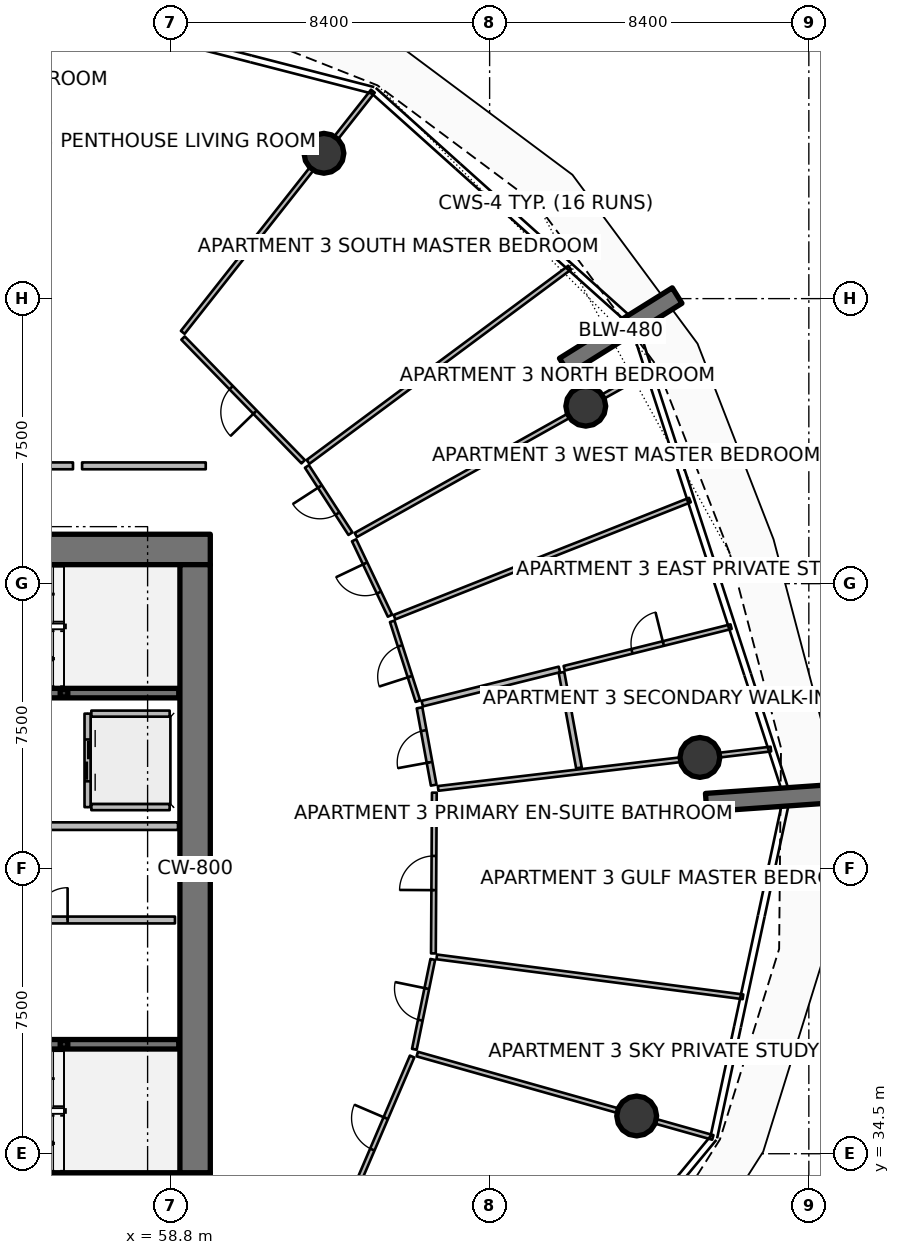
"""IFC4 building model, lengths in metres.
Left out: names, types, materials, properties, quantities, classifications, styles, units other than length and angle.
Written with IfcOpenShell. Run it as: python <this file> out.ifc"""

import sys

from ifc_helpers import new_model, si_unit, direction, frame, frame_2d, origin, origin_2d, place, context, subcontext, project, spatial, rectangle, hollow_rectangle, circle, extrude, element, fill, save


model = new_model("IFC4")
c1 = context("Model", 3, precision=1e-05, world=origin(), true_north=direction((0.0, 1.0)))
c2 = subcontext(c1, "Body", "Model", "MODEL_VIEW")
j1 = project(units=[si_unit("LENGTHUNIT", "METRE"), si_unit("PLANEANGLEUNIT", "RADIAN")], contexts=[c1])
p1 = place(None, origin())
s1 = spatial("IfcSite", under=j1, at=p1, CompositionType="ELEMENT")
p2 = place(p1, origin())
s2 = spatial("IfcBuilding", under=s1, at=p2, CompositionType="ELEMENT")
p3 = place(p2, frame((0.0, 0.0, 127.8)))
s3 = spatial("IfcBuildingStorey", under=s2, at=p3, CompositionType="ELEMENT", Elevation=127.8)
for number, where, z_axis, x_axis in (
    (1, (49.95, 33.6, 0.0), (0.0, 0.0, 1.0), (1.0, 0.0, 0.0)),
    (2, (49.95, 50.4, 0.0), (0.0, 0.0, 1.0), (1.0, 0.0, 0.0)),
):
    element("IfcWall", number, at=place(p3, frame(where, z_axis=z_axis, x_axis=x_axis)), inside=s3, PredefinedType="SHEAR", context=c2, shape_type="SweptSolid", body=[
        extrude(rectangle(XDim=9.9, YDim=0.8, at=frame_2d((4.95, 0.0))), origin(), (0.0, 0.0, 1.0), 3.75),
    ])
p4 = place(p3, frame((59.45, 34.0, 0.0), z_axis=(0.0, 0.0, 1.0), x_axis=(0.0, 1.0, 0.0)))
e3 = element("IfcWall", 3, at=p4, inside=s3, PredefinedType="SHEAR", context=c2, shape_type="SweptSolid", body=[
    extrude(rectangle(XDim=16.0, YDim=0.8, at=frame_2d((8.0, 0.0))), origin(), (0.0, 0.0, 1.0), 3.75),
])
for number, where, z_axis, x_axis in (
    (4, (56.0, 46.62, 0.0), (0.0, 0.0, 1.0), (1.0, 0.0, 0.0)),
    (5, (56.0, 37.38, 0.0), (0.0, 0.0, 1.0), (1.0, 0.0, 0.0)),
):
    element("IfcColumn", number, at=place(p3, frame(where, z_axis=z_axis, x_axis=x_axis)), inside=s3, PredefinedType="COLUMN", context=c2, shape_type="SweptSolid", body=[
        extrude(hollow_rectangle(XDim=0.2, YDim=0.2, WallThickness=0.01, InnerFilletRadius=0.01, OuterFilletRadius=0.02, at=origin_2d()), origin(), (0.0, 0.0, 1.0), 1.67),
    ])
for number, where, z_axis, x_axis in (
    (6, (69.165, 55.226, 0.0), (0.0, 0.0, 1.0), (0.848, 0.53, 0.0)),
    (7, (72.897, 43.741, 0.0), (0.0, 0.0, 1.0), (0.998, 0.07, 0.0)),
):
    element("IfcWall", number, at=place(p3, frame(where, z_axis=z_axis, x_axis=x_axis)), inside=s3, PredefinedType="SOLIDWALL", context=c2, shape_type="SweptSolid", body=[
        extrude(rectangle(XDim=3.5, YDim=0.48, at=frame_2d((1.75, 0.0))), origin(), (0.0, 0.0, 1.0), 3.75),
    ])
for number, where, z_axis, x_axis in (
    (8, (69.73, 54.169, 0.0), (0.0, 0.0, 1.0), (1.0, 0.0, 0.0)),
    (9, (62.84, 60.824, 0.0), (0.0, 0.0, 1.0), (1.0, 0.0, 0.0)),
    (10, (71.07, 35.494, 0.0), (0.0, 0.0, 1.0), (1.0, 0.0, 0.0)),
    (11, (72.733, 44.927, 0.0), (0.0, 0.0, 1.0), (1.0, 0.0, 0.0)),
):
    element("IfcColumn", number, at=place(p3, frame(where, z_axis=z_axis, x_axis=x_axis)), inside=s3, PredefinedType="COLUMN", context=c2, shape_type="SweptSolid", body=[
        extrude(circle(Radius=0.525, at=origin_2d()), origin(), (0.0, 0.0, 1.0), 3.5),
    ])
p5 = place(p3, frame((51.48, 46.62, 0.0), z_axis=(0.0, 0.0, 1.0), x_axis=(1.0, 0.0, 0.0)))
e12 = element("IfcWall", 12, at=p5, inside=s3, PredefinedType="SOLIDWALL", context=c2, shape_type="SweptSolid", body=[
    extrude(rectangle(XDim=7.54, YDim=0.25, at=frame_2d((3.77, 0.0))), origin(), (0.0, 0.0, 1.0), 3.5),
])
p6 = place(p5, frame((0.3, 0.0, 0.0)))
e13 = element("IfcOpeningElement", 13, at=p6, cuts=e12, PredefinedType="OPENING", context=c2, shape_type="SweptSolid", body=[
    extrude(rectangle(XDim=1.55, YDim=2.15, at=frame_2d((0.775, 1.075))), frame((0.0, 0.135, 0.0), z_axis=(0.0, -1.0, 0.0), x_axis=(1.0, 0.0, 0.0)), (0.0, 0.0, 1.0), 0.27),
])
p7 = place(p3, frame((51.48, 37.38, 0.0), z_axis=(0.0, 0.0, 1.0), x_axis=(1.0, 0.0, 0.0)))
e14 = element("IfcWall", 14, at=p7, inside=s3, PredefinedType="SOLIDWALL", context=c2, shape_type="SweptSolid", body=[
    extrude(rectangle(XDim=7.54, YDim=0.25, at=frame_2d((3.77, 0.0))), origin(), (0.0, 0.0, 1.0), 3.5),
])
p8 = place(p7, frame((0.3, 0.0, 0.0)))
e15 = element("IfcOpeningElement", 15, at=p8, cuts=e14, PredefinedType="OPENING", context=c2, shape_type="SweptSolid", body=[
    extrude(rectangle(XDim=1.55, YDim=2.15, at=frame_2d((0.775, 1.075))), frame((0.0, 0.135, 0.0), z_axis=(0.0, -1.0, 0.0), x_axis=(1.0, 0.0, 0.0)), (0.0, 0.0, 1.0), 0.27),
])
p9 = place(p3, frame((56.62, 46.08, 0.0), z_axis=(0.0, 0.0, 1.0), x_axis=(0.0, -1.0, 0.0)))
e16 = element("IfcWall", 16, at=p9, inside=s3, PredefinedType="PARTITIONING", context=c2, shape_type="SweptSolid", body=[
    extrude(rectangle(XDim=2.46, YDim=0.16, at=frame_2d((1.23, 0.0))), origin(), (0.0, 0.0, 1.0), 3.5),
])
p10 = place(p9, frame((0.68, 0.0, 0.0)))
e17 = element("IfcOpeningElement", 17, at=p10, cuts=e16, PredefinedType="OPENING", context=c2, shape_type="SweptSolid", body=[
    extrude(rectangle(XDim=1.1, YDim=2.1, at=frame_2d((0.55, 1.05))), frame((0.0, 0.09, 0.0), z_axis=(0.0, -1.0, 0.0), x_axis=(1.0, 0.0, 0.0)), (0.0, 0.0, 1.0), 0.18),
])
for number, where, z_axis, x_axis in (
    (18, (56.72, 46.08, 0.0), (0.0, 0.0, 1.0), (1.0, 0.0, 0.0)),
    (19, (56.72, 43.62, 0.0), (0.0, 0.0, 1.0), (1.0, 0.0, 0.0)),
):
    element("IfcWall", number, at=place(p3, frame(where, z_axis=z_axis, x_axis=x_axis)), inside=s3, PredefinedType="PARTITIONING", context=c2, shape_type="SweptSolid", body=[
        extrude(rectangle(XDim=2.06, YDim=0.16, at=frame_2d((1.03, 0.0))), origin(), (0.0, 0.0, 1.0), 3.5),
    ])
p11 = place(p3, frame((52.42, 40.65, 0.0), z_axis=(0.0, 0.0, 1.0), x_axis=(1.0, 0.0, 0.0)))
e20 = element("IfcWall", 20, at=p11, inside=s3, PredefinedType="PARTITIONING", context=c2, shape_type="SweptSolid", body=[
    extrude(rectangle(XDim=6.5, YDim=0.18, at=frame_2d((3.25, 0.0))), origin(), (0.0, 0.0, 1.0), 3.5),
])
p12 = place(p11, frame((2.825, 0.0, 0.0)))
e21 = element("IfcOpeningElement", 21, at=p12, cuts=e20, PredefinedType="OPENING", context=c2, shape_type="SweptSolid", body=[
    extrude(rectangle(XDim=0.85, YDim=2.06, at=frame_2d((0.425, 1.03))), frame((0.0, 0.1, 0.0), z_axis=(0.0, -1.0, 0.0), x_axis=(1.0, 0.0, 0.0)), (0.0, 0.0, 1.0), 0.2),
])
p13 = place(p3, frame((50.12, 43.12, 0.0), z_axis=(0.0, 0.0, 1.0), x_axis=(1.0, 0.0, 0.0)))
e22 = element("IfcWall", 22, at=p13, inside=s3, PredefinedType="PARTITIONING", context=c2, shape_type="SweptSolid", body=[
    extrude(rectangle(XDim=8.88, YDim=0.2, at=frame_2d((4.44, 0.0))), origin(), (0.0, 0.0, 1.0), 3.5),
])
p14 = place(p3, frame((56.236, 52.6, 0.0), z_axis=(0.0, 0.0, 1.0), x_axis=(-1.0, 0.0, 0.0)))
e23 = element("IfcWall", 23, at=p14, inside=s3, PredefinedType="PARTITIONING", context=c2, shape_type="SweptSolid", body=[
    extrude(rectangle(XDim=5.127, YDim=0.18, at=frame_2d((2.563, 0.0))), origin(), (0.0, 0.0, 1.0), 2.94),
])
p15 = place(p14, frame((2.013, 0.0, 0.0)))
e24 = element("IfcOpeningElement", 24, at=p15, cuts=e23, PredefinedType="OPENING", context=c2, shape_type="SweptSolid", body=[
    extrude(rectangle(XDim=1.1, YDim=2.1, at=frame_2d((0.55, 1.05))), frame((0.0, 0.1, 0.0), z_axis=(0.0, -1.0, 0.0), x_axis=(1.0, 0.0, 0.0)), (0.0, 0.0, 1.0), 0.2),
])
p16 = place(p3, frame((63.42, 32.989, 0.0), z_axis=(0.0, 0.0, 1.0), x_axis=(0.393166713518, 0.919467201906, 0.0)))
e25 = element("IfcWall", 25, at=p16, inside=s3, PredefinedType="PARTITIONING", context=c2, shape_type="SweptSolid", body=[
    extrude(rectangle(XDim=4.425, YDim=0.125, at=frame_2d((2.212, 0.0))), origin(), (0.0, 0.0, 1.0), 2.94),
])
p17 = place(p16, frame((1.762, 0.0, 0.0)))
e26 = element("IfcOpeningElement", 26, at=p17, cuts=e25, PredefinedType="OPENING", context=c2, shape_type="SweptSolid", body=[
    extrude(rectangle(XDim=0.9, YDim=2.08, at=frame_2d((0.45, 1.04))), frame((0.0, 0.073, 0.0), z_axis=(0.0, -1.0, 0.0), x_axis=(1.0, 0.0, 0.0)), (0.0, 0.0, 1.0), 0.145),
])
p18 = place(p3, frame((65.295, 37.122, 0.0), z_axis=(0.0, 0.0, 1.0), x_axis=(0.96245433073, -0.271443661297, 0.0)))
e27 = element("IfcWall", 27, at=p18, inside=s3, PredefinedType="PARTITIONING", context=c2, shape_type="SweptSolid", body=[
    extrude(rectangle(XDim=8.081, YDim=0.125, at=frame_2d((4.041, 0.0))), origin(), (0.0, 0.0, 1.0), 2.94),
])
p19 = place(p3, frame((65.809, 39.679, 0.0), z_axis=(0.0, 0.0, 1.0), x_axis=(0.991611465086, -0.129254409247, 0.0)))
e28 = element("IfcWall", 28, at=p19, inside=s3, PredefinedType="PARTITIONING", context=c2, shape_type="SweptSolid", body=[
    extrude(rectangle(XDim=8.126, YDim=0.125, at=frame_2d((4.063, 0.0))), origin(), (0.0, 0.0, 1.0), 2.94),
])
p20 = place(p3, frame((65.219, 37.247, 0.0), z_axis=(0.0, 0.0, 1.0), x_axis=(0.20083963331, 0.979624132865, 0.0)))
e29 = element("IfcWall", 29, at=p20, inside=s3, PredefinedType="PARTITIONING", context=c2, shape_type="SweptSolid", body=[
    extrude(rectangle(XDim=2.414, YDim=0.125, at=frame_2d((1.207, 0.0))), origin(), (0.0, 0.0, 1.0), 2.94),
])
p21 = place(p20, frame((0.782, 0.0, 0.0)))
e30 = element("IfcOpeningElement", 30, at=p21, cuts=e29, PredefinedType="OPENING", context=c2, shape_type="SweptSolid", body=[
    extrude(rectangle(XDim=0.85, YDim=2.06, at=frame_2d((0.425, 1.03))), frame((0.0, 0.073, 0.0), z_axis=(0.0, -1.0, 0.0), x_axis=(1.0, 0.0, 0.0)), (0.0, 0.0, 1.0), 0.145),
])
p22 = place(p3, frame((65.721, 39.771, 0.0), z_axis=(0.0, 0.0, 1.0), x_axis=(0.005887343855, 0.999982669441, 0.0)))
e31 = element("IfcWall", 31, at=p22, inside=s3, PredefinedType="PARTITIONING", context=c2, shape_type="SweptSolid", body=[
    extrude(rectangle(XDim=4.23, YDim=0.125, at=frame_2d((2.115, 0.0))), origin(), (0.0, 0.0, 1.0), 2.94),
])
p23 = place(p22, frame((1.665, 0.0, 0.0)))
e32 = element("IfcOpeningElement", 32, at=p23, cuts=e31, PredefinedType="OPENING", context=c2, shape_type="SweptSolid", body=[
    extrude(rectangle(XDim=0.9, YDim=2.08, at=frame_2d((0.45, 1.04))), frame((0.0, 0.073, 0.0), z_axis=(0.0, -1.0, 0.0), x_axis=(1.0, 0.0, 0.0)), (0.0, 0.0, 1.0), 0.145),
])
p24 = place(p3, frame((65.845, 44.112, 0.0), z_axis=(0.0, 0.0, 1.0), x_axis=(0.993069843717, 0.117525680174, 0.0)))
e33 = element("IfcWall", 33, at=p24, inside=s3, PredefinedType="PARTITIONING", context=c2, shape_type="SweptSolid", body=[
    extrude(rectangle(XDim=8.816, YDim=0.125, at=frame_2d((4.408, 0.0))), origin(), (0.0, 0.0, 1.0), 2.94),
])
p25 = place(p3, frame((65.728, 44.199, 0.0), z_axis=(0.0, 0.0, 1.0), x_axis=(-0.180017600937, 0.983663389251, 0.0)))
e34 = element("IfcWall", 34, at=p25, inside=s3, PredefinedType="PARTITIONING", context=c2, shape_type="SweptSolid", body=[
    extrude(rectangle(XDim=2.068, YDim=0.15, at=frame_2d((1.034, 0.0))), origin(), (0.0, 0.0, 1.0), 2.94),
])
p26 = place(p25, frame((0.609, 0.0, 0.0)))
e35 = element("IfcOpeningElement", 35, at=p26, cuts=e34, PredefinedType="OPENING", context=c2, shape_type="SweptSolid", body=[
    extrude(rectangle(XDim=0.85, YDim=2.06, at=frame_2d((0.425, 1.03))), frame((0.0, 0.085, 0.0), z_axis=(0.0, -1.0, 0.0), x_axis=(1.0, 0.0, 0.0)), (0.0, 0.0, 1.0), 0.17),
])
p27 = place(p3, frame((69.552, 44.651, 0.0), z_axis=(0.0, 0.0, 1.0), x_axis=(-0.18004586416, 0.983658216455, 0.0)))
e36 = element("IfcWall", 36, at=p27, inside=s3, PredefinedType="PARTITIONING", context=c2, shape_type="SweptSolid", body=[
    extrude(rectangle(XDim=2.555, YDim=0.15, at=frame_2d((1.277, 0.0))), origin(), (0.0, 0.0, 1.0), 2.94),
])
p28 = place(p3, frame((65.427, 46.344, 0.0), z_axis=(0.0, 0.0, 1.0), x_axis=(0.97033137229, 0.241778882348, 0.0)))
e37 = element("IfcWall", 37, at=p28, inside=s3, PredefinedType="PARTITIONING", context=c2, shape_type="SweptSolid", body=[
    extrude(rectangle(XDim=3.72, YDim=0.15, at=frame_2d((1.86, 0.0))), origin(), (0.0, 0.0, 1.0), 2.94),
])
p29 = place(p3, frame((69.163, 47.274, 0.0), z_axis=(0.0, 0.0, 1.0), x_axis=(0.970313623087, 0.241850104098, 0.0)))
e38 = element("IfcWall", 38, at=p29, inside=s3, PredefinedType="PARTITIONING", context=c2, shape_type="SweptSolid", body=[
    extrude(rectangle(XDim=4.525, YDim=0.125, at=frame_2d((2.263, 0.0))), origin(), (0.0, 0.0, 1.0), 2.94),
])
p30 = place(p29, frame((1.838, 0.0, 0.0)))
e39 = element("IfcOpeningElement", 39, at=p30, cuts=e38, PredefinedType="OPENING", context=c2, shape_type="SweptSolid", body=[
    extrude(rectangle(XDim=0.85, YDim=2.06, at=frame_2d((0.425, 1.03))), frame((0.0, 0.073, 0.0), z_axis=(0.0, -1.0, 0.0), x_axis=(1.0, 0.0, 0.0)), (0.0, 0.0, 1.0), 0.145),
])
p31 = place(p3, frame((64.696, 48.618, 0.0), z_axis=(0.0, 0.0, 1.0), x_axis=(0.92963773473, 0.368474805335, 0.0)))
e40 = element("IfcWall", 40, at=p31, inside=s3, PredefinedType="PARTITIONING", context=c2, shape_type="SweptSolid", body=[
    extrude(rectangle(XDim=8.364, YDim=0.125, at=frame_2d((4.182, 0.0))), origin(), (0.0, 0.0, 1.0), 2.94),
])
p32 = place(p3, frame((65.312, 46.407, 0.0), z_axis=(0.0, 0.0, 1.0), x_axis=(-0.305823000028, 0.952088384896, 0.0)))
e41 = element("IfcWall", 41, at=p32, inside=s3, PredefinedType="PARTITIONING", context=c2, shape_type="SweptSolid", body=[
    extrude(rectangle(XDim=2.207, YDim=0.125, at=frame_2d((1.104, 0.0))), origin(), (0.0, 0.0, 1.0), 2.94),
])
p33 = place(p32, frame((0.679, 0.0, 0.0)))
e42 = element("IfcOpeningElement", 42, at=p33, cuts=e41, PredefinedType="OPENING", context=c2, shape_type="SweptSolid", body=[
    extrude(rectangle(XDim=0.85, YDim=2.06, at=frame_2d((0.425, 1.03))), frame((0.0, 0.073, 0.0), z_axis=(0.0, -1.0, 0.0), x_axis=(1.0, 0.0, 0.0)), (0.0, 0.0, 1.0), 0.145),
])
p34 = place(p3, frame((64.578, 48.657, 0.0), z_axis=(0.0, 0.0, 1.0), x_axis=(-0.429437528435, 0.903096566914, 0.0)))
e43 = element("IfcWall", 43, at=p34, inside=s3, PredefinedType="PARTITIONING", context=c2, shape_type="SweptSolid", body=[
    extrude(rectangle(XDim=2.197, YDim=0.125, at=frame_2d((1.099, 0.0))), origin(), (0.0, 0.0, 1.0), 2.94),
])
p35 = place(p34, frame((0.674, 0.0, 0.0)))
e44 = element("IfcOpeningElement", 44, at=p35, cuts=e43, PredefinedType="OPENING", context=c2, shape_type="SweptSolid", body=[
    extrude(rectangle(XDim=0.85, YDim=2.06, at=frame_2d((0.425, 1.03))), frame((0.0, 0.073, 0.0), z_axis=(0.0, -1.0, 0.0), x_axis=(1.0, 0.0, 0.0)), (0.0, 0.0, 1.0), 0.145),
])
p36 = place(p3, frame((59.73, 52.6, 0.0), z_axis=(0.0, 0.0, 1.0), x_axis=(-1.0, 0.0, 0.0)))
e45 = element("IfcWall", 45, at=p36, inside=s3, PredefinedType="PARTITIONING", context=c2, shape_type="SweptSolid", body=[
    extrude(rectangle(XDim=3.254, YDim=0.18, at=frame_2d((1.627, 0.0))), origin(), (0.0, 0.0, 1.0), 2.94),
])
p37 = place(p3, frame((63.679, 50.781, 0.0), z_axis=(0.0, 0.0, 1.0), x_axis=(0.872493265844, 0.488626136281, 0.0)))
e46 = element("IfcWall", 46, at=p37, inside=s3, PredefinedType="PARTITIONING", context=c2, shape_type="SweptSolid", body=[
    extrude(rectangle(XDim=8.816, YDim=0.125, at=frame_2d((4.408, 0.0))), origin(), (0.0, 0.0, 1.0), 2.94),
])
p38 = place(p3, frame((59.125, 56.112, 0.0), z_axis=(0.0, 0.0, 1.0), x_axis=(0.61910151414, 0.78531096719, 0.0)))
e47 = element("IfcWall", 47, at=p38, inside=s3, PredefinedType="PARTITIONING", context=c2, shape_type="SweptSolid", body=[
    extrude(rectangle(XDim=8.082, YDim=0.125, at=frame_2d((4.041, 0.0))), origin(), (0.0, 0.0, 1.0), 2.94),
])
p39 = place(p3, frame((62.421, 52.704, 0.0), z_axis=(0.0, 0.0, 1.0), x_axis=(0.802973178232, 0.596015163431, 0.0)))
e48 = element("IfcWall", 48, at=p39, inside=s3, PredefinedType="PARTITIONING", context=c2, shape_type="SweptSolid", body=[
    extrude(rectangle(XDim=8.574, YDim=0.125, at=frame_2d((4.287, 0.0))), origin(), (0.0, 0.0, 1.0), 2.94),
])
p40 = place(p3, frame((63.537, 50.816, 0.0), z_axis=(0.0, 0.0, 1.0), x_axis=(-0.543467563656, 0.839430168182, 0.0)))
e49 = element("IfcWall", 49, at=p40, inside=s3, PredefinedType="PARTITIONING", context=c2, shape_type="SweptSolid", body=[
    extrude(rectangle(XDim=2.106, YDim=0.125, at=frame_2d((1.053, 0.0))), origin(), (0.0, 0.0, 1.0), 2.94),
])
p41 = place(p40, frame((0.628, 0.0, 0.0)))
e50 = element("IfcOpeningElement", 50, at=p41, cuts=e49, PredefinedType="OPENING", context=c2, shape_type="SweptSolid", body=[
    extrude(rectangle(XDim=0.85, YDim=2.06, at=frame_2d((0.425, 1.03))), frame((0.0, 0.073, 0.0), z_axis=(0.0, -1.0, 0.0), x_axis=(1.0, 0.0, 0.0)), (0.0, 0.0, 1.0), 0.145),
])
p42 = place(p3, frame((62.293, 52.708, 0.0), z_axis=(0.0, 0.0, 1.0), x_axis=(-0.696779354898, 0.717285529331, 0.0)))
e51 = element("IfcWall", 51, at=p42, inside=s3, PredefinedType="PARTITIONING", context=c2, shape_type="SweptSolid", body=[
    extrude(rectangle(XDim=4.536, YDim=0.125, at=frame_2d((2.268, 0.0))), origin(), (0.0, 0.0, 1.0), 2.94),
])
p43 = place(p42, frame((1.818, 0.0, 0.0)))
e52 = element("IfcOpeningElement", 52, at=p43, cuts=e51, PredefinedType="OPENING", context=c2, shape_type="SweptSolid", body=[
    extrude(rectangle(XDim=0.9, YDim=2.08, at=frame_2d((0.45, 1.04))), frame((0.0, 0.073, 0.0), z_axis=(0.0, -1.0, 0.0), x_axis=(1.0, 0.0, 0.0)), (0.0, 0.0, 1.0), 0.145),
])
p44 = place(p10, origin())
e53 = element("IfcDoor", 53, at=p44, inside=s3, OperationType="DOUBLE_DOOR_SLIDING", PredefinedType="DOOR", context=c2, shape_type="SweptSolid", body=[
    extrude(rectangle(XDim=1.1, YDim=2.1, at=frame_2d((0.55, 1.05))), frame((0.0, 0.025, 0.0), z_axis=(0.0, -1.0, 0.0), x_axis=(1.0, 0.0, 0.0)), (0.0, 0.0, 1.0), 0.05),
])
fill(e17, e53)
p45 = place(p12, origin())
e54 = element("IfcDoor", 54, at=p45, inside=s3, OperationType="SINGLE_SWING_RIGHT", PredefinedType="DOOR", context=c2, shape_type="SweptSolid", body=[
    extrude(rectangle(XDim=0.85, YDim=2.06, at=frame_2d((0.425, 1.03))), frame((0.0, 0.025, 0.0), z_axis=(0.0, -1.0, 0.0), x_axis=(1.0, 0.0, 0.0)), (0.0, 0.0, 1.0), 0.05),
])
fill(e21, e54)
p46 = place(p17, origin())
e55 = element("IfcDoor", 55, at=p46, inside=s3, OperationType="SINGLE_SWING_RIGHT", PredefinedType="DOOR", context=c2, shape_type="SweptSolid", body=[
    extrude(rectangle(XDim=0.9, YDim=2.08, at=frame_2d((0.45, 1.04))), frame((0.0, 0.025, 0.0), z_axis=(0.0, -1.0, 0.0), x_axis=(1.0, 0.0, 0.0)), (0.0, 0.0, 1.0), 0.05),
])
fill(e26, e55)
p47 = place(p21, origin())
e56 = element("IfcDoor", 56, at=p47, inside=s3, OperationType="SINGLE_SWING_RIGHT", PredefinedType="DOOR", context=c2, shape_type="SweptSolid", body=[
    extrude(rectangle(XDim=0.85, YDim=2.06, at=frame_2d((0.425, 1.03))), frame((0.0, 0.025, 0.0), z_axis=(0.0, -1.0, 0.0), x_axis=(1.0, 0.0, 0.0)), (0.0, 0.0, 1.0), 0.05),
])
fill(e30, e56)
p48 = place(p23, origin())
e57 = element("IfcDoor", 57, at=p48, inside=s3, OperationType="SINGLE_SWING_LEFT", PredefinedType="DOOR", context=c2, shape_type="SweptSolid", body=[
    extrude(rectangle(XDim=0.9, YDim=2.08, at=frame_2d((0.45, 1.04))), frame((0.0, 0.025, 0.0), z_axis=(0.0, -1.0, 0.0), x_axis=(1.0, 0.0, 0.0)), (0.0, 0.0, 1.0), 0.05),
])
fill(e32, e57)
p49 = place(p26, origin())
e58 = element("IfcDoor", 58, at=p49, inside=s3, OperationType="SINGLE_SWING_LEFT", PredefinedType="DOOR", context=c2, shape_type="SweptSolid", body=[
    extrude(rectangle(XDim=0.85, YDim=2.06, at=frame_2d((0.425, 1.03))), frame((0.0, 0.025, 0.0), z_axis=(0.0, -1.0, 0.0), x_axis=(1.0, 0.0, 0.0)), (0.0, 0.0, 1.0), 0.05),
])
fill(e35, e58)
p50 = place(p30, origin())
e59 = element("IfcDoor", 59, at=p50, inside=s3, OperationType="SINGLE_SWING_RIGHT", PredefinedType="DOOR", context=c2, shape_type="SweptSolid", body=[
    extrude(rectangle(XDim=0.85, YDim=2.06, at=frame_2d((0.425, 1.03))), frame((0.0, 0.025, 0.0), z_axis=(0.0, -1.0, 0.0), x_axis=(1.0, 0.0, 0.0)), (0.0, 0.0, 1.0), 0.05),
])
fill(e39, e59)
p51 = place(p33, origin())
e60 = element("IfcDoor", 60, at=p51, inside=s3, OperationType="SINGLE_SWING_LEFT", PredefinedType="DOOR", context=c2, shape_type="SweptSolid", body=[
    extrude(rectangle(XDim=0.85, YDim=2.06, at=frame_2d((0.425, 1.03))), frame((0.0, 0.025, 0.0), z_axis=(0.0, -1.0, 0.0), x_axis=(1.0, 0.0, 0.0)), (0.0, 0.0, 1.0), 0.05),
])
fill(e42, e60)
p52 = place(p35, origin())
e61 = element("IfcDoor", 61, at=p52, inside=s3, OperationType="SINGLE_SWING_RIGHT", PredefinedType="DOOR", context=c2, shape_type="SweptSolid", body=[
    extrude(rectangle(XDim=0.85, YDim=2.06, at=frame_2d((0.425, 1.03))), frame((0.0, 0.025, 0.0), z_axis=(0.0, -1.0, 0.0), x_axis=(1.0, 0.0, 0.0)), (0.0, 0.0, 1.0), 0.05),
])
fill(e44, e61)
p53 = place(p41, origin())
e62 = element("IfcDoor", 62, at=p53, inside=s3, OperationType="SINGLE_SWING_RIGHT", PredefinedType="DOOR", context=c2, shape_type="SweptSolid", body=[
    extrude(rectangle(XDim=0.85, YDim=2.06, at=frame_2d((0.425, 1.03))), frame((0.0, 0.025, 0.0), z_axis=(0.0, -1.0, 0.0), x_axis=(1.0, 0.0, 0.0)), (0.0, 0.0, 1.0), 0.05),
])
fill(e50, e62)
p54 = place(p43, origin())
e63 = element("IfcDoor", 63, at=p54, inside=s3, OperationType="SINGLE_SWING_LEFT", PredefinedType="DOOR", context=c2, shape_type="SweptSolid", body=[
    extrude(rectangle(XDim=0.9, YDim=2.08, at=frame_2d((0.45, 1.04))), frame((0.0, 0.025, 0.0), z_axis=(0.0, -1.0, 0.0), x_axis=(1.0, 0.0, 0.0)), (0.0, 0.0, 1.0), 0.05),
])
fill(e52, e63)
save(model, sys.argv[1])
